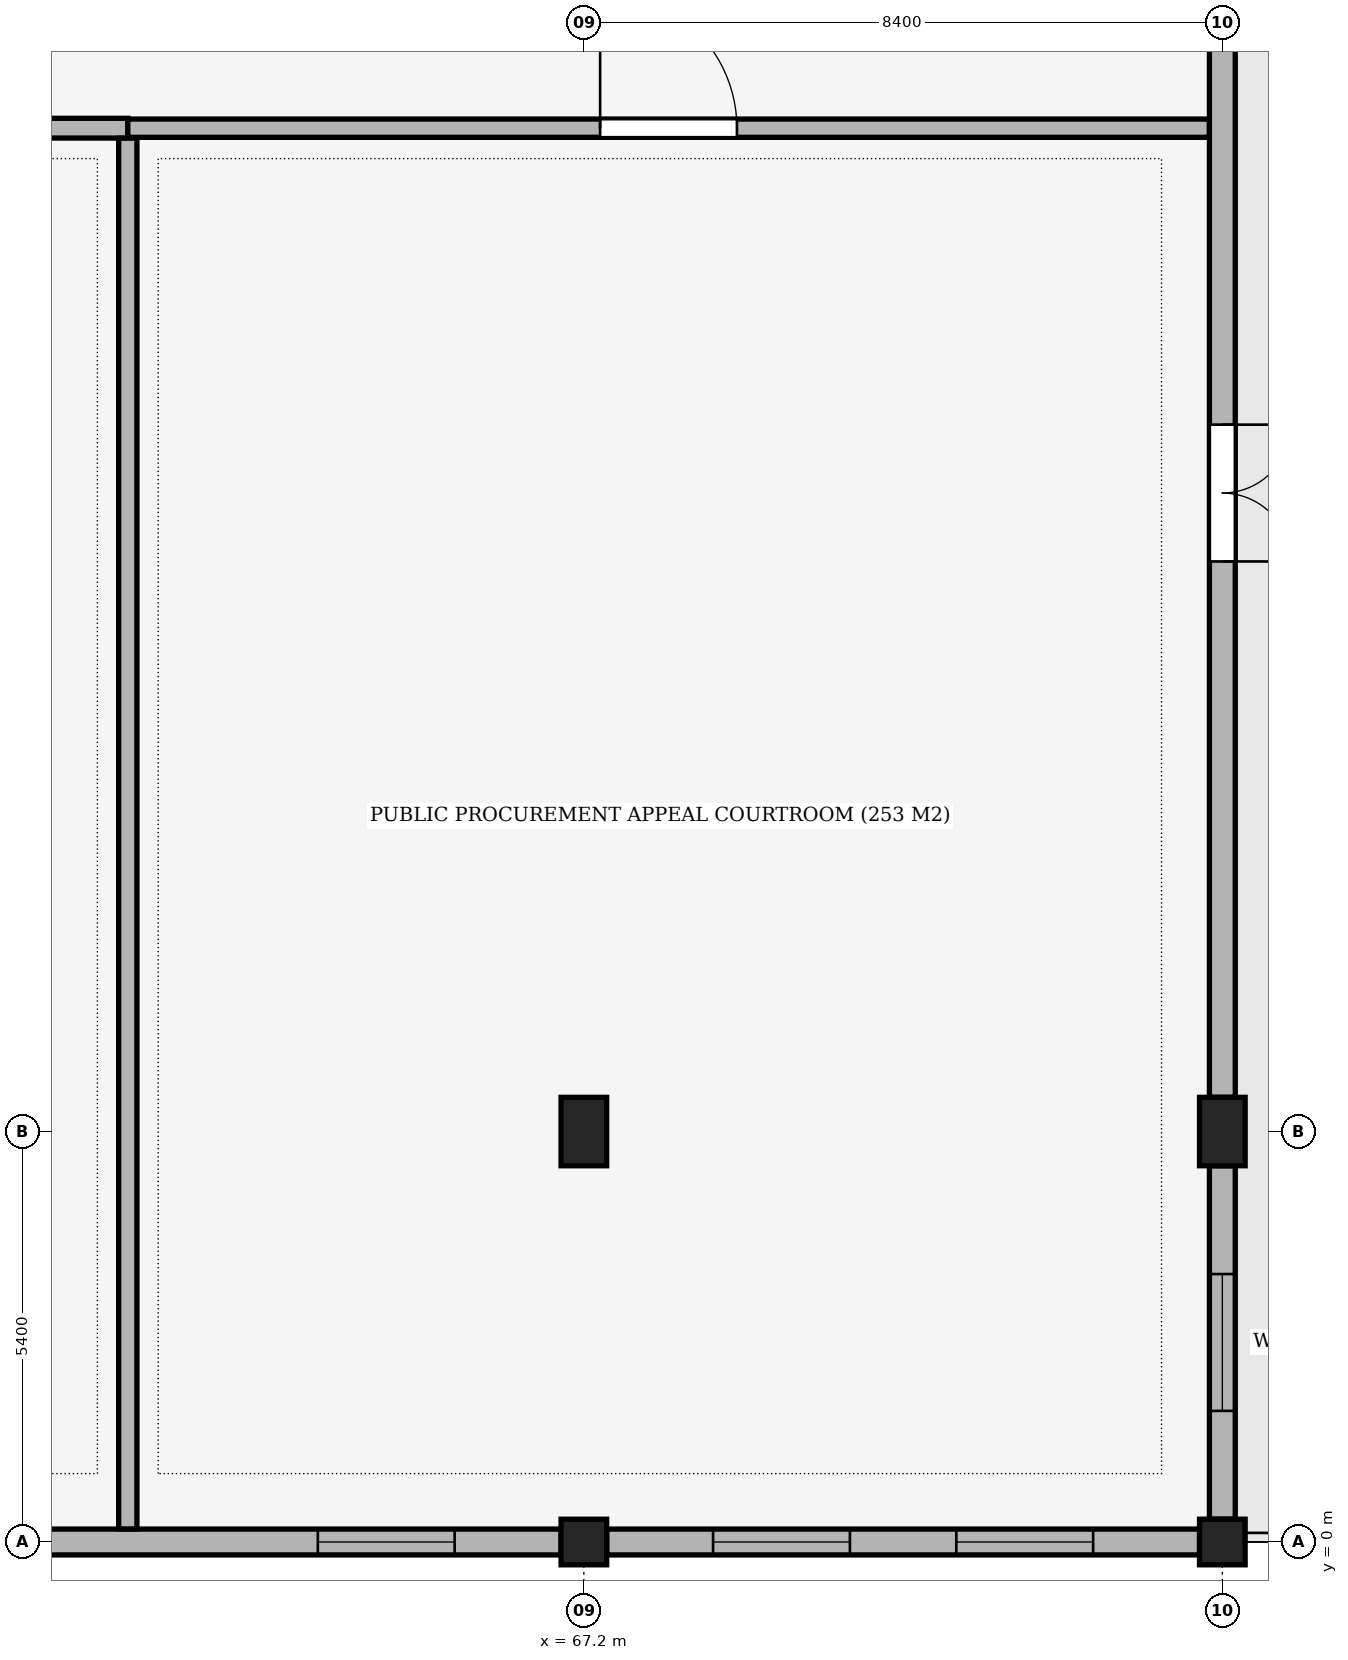
"""IFC4 building model, lengths in metres.
Left out: names, types, materials, properties, quantities, classifications, styles, units other than length and angle.
Written with IfcOpenShell. Run it as: python <this file> out.ifc"""

import sys

from ifc_helpers import new_model, si_unit, direction, frame, frame_2d, origin, origin_2d, place, context, subcontext, project, spatial, rectangle, extrude, element, fill, save


model = new_model("IFC4")
c1 = context("Model", 3, precision=1e-05, world=origin(), true_north=direction((0.0, 1.0)))
c2 = subcontext(c1, "Body", "Model", "MODEL_VIEW")
j1 = project(units=[si_unit("LENGTHUNIT", "METRE"), si_unit("PLANEANGLEUNIT", "RADIAN")], contexts=[c1])
p1 = place(None, origin())
s1 = spatial("IfcSite", under=j1, at=p1, CompositionType="ELEMENT")
p2 = place(p1, origin())
s2 = spatial("IfcBuilding", under=s1, at=p2, CompositionType="ELEMENT")
p3 = place(p2, frame((0.0, 0.0, 20.4)))
s3 = spatial("IfcBuildingStorey", under=s2, at=p3, CompositionType="ELEMENT", Elevation=20.4)
p4 = place(p3, frame((67.2, 0.0, 0.0), z_axis=(0.0, 0.0, 1.0), x_axis=(1.0, 0.0, 0.0)))
e1 = element("IfcColumn", 1, at=p4, inside=s3, PredefinedType="COLUMN", context=c2, shape_type="SweptSolid", body=[
    extrude(rectangle(XDim=0.6, YDim=0.6, at=origin_2d()), origin(), (0.0, 0.0, 1.0), 4.8),
])
p5 = place(p3, frame((67.2, 5.4, 0.0), z_axis=(0.0, 0.0, 1.0), x_axis=(1.0, 0.0, 0.0)))
e2 = element("IfcColumn", 2, at=p5, inside=s3, PredefinedType="COLUMN", context=c2, shape_type="SweptSolid", body=[
    extrude(rectangle(XDim=0.6, YDim=0.9, at=origin_2d()), origin(), (0.0, 0.0, 1.0), 4.8),
])
p6 = place(p3, frame((75.6, 0.0, 0.0), z_axis=(0.0, 0.0, 1.0), x_axis=(1.0, 0.0, 0.0)))
e3 = element("IfcColumn", 3, at=p6, inside=s3, PredefinedType="COLUMN", context=c2, shape_type="SweptSolid", body=[
    extrude(rectangle(XDim=0.6, YDim=0.6, at=origin_2d()), origin(), (0.0, 0.0, 1.0), 4.8),
])
p7 = place(p3, frame((75.6, 5.4, 0.0), z_axis=(0.0, 0.0, 1.0), x_axis=(1.0, 0.0, 0.0)))
e4 = element("IfcColumn", 4, at=p7, inside=s3, PredefinedType="COLUMN", context=c2, shape_type="SweptSolid", body=[
    extrude(rectangle(XDim=0.6, YDim=0.9, at=origin_2d()), origin(), (0.0, 0.0, 1.0), 4.8),
])
p8 = place(p3, frame((75.6, 21.75, 0.0), z_axis=(0.0, 0.0, 1.0), x_axis=(0.0, -1.0, 0.0)))
e5 = element("IfcWall", 5, at=p8, inside=s3, PredefinedType="SOLIDWALL", context=c2, shape_type="SweptSolid", body=[
    extrude(rectangle(XDim=15.9, YDim=0.34, at=frame_2d((7.95, 0.0))), origin(), (0.0, 0.0, 1.0), 3.5),
])
p9 = place(p8, frame((7.05, 0.0, 0.0)))
e6 = element("IfcOpeningElement", 6, at=p9, cuts=e5, PredefinedType="OPENING", context=c2, shape_type="SweptSolid", body=[
    extrude(rectangle(XDim=1.8, YDim=2.2, at=frame_2d((0.9, 1.1))), frame((0.0, 0.185, 0.0), z_axis=(0.0, -1.0, 0.0), x_axis=(1.0, 0.0, 0.0)), (0.0, 0.0, 1.0), 0.37),
])
p10 = place(p3, frame((75.6, 4.95, 0.0), z_axis=(0.0, 0.0, 1.0), x_axis=(0.0, -1.0, 0.0)))
e7 = element("IfcWall", 7, at=p10, inside=s3, PredefinedType="SOLIDWALL", context=c2, shape_type="SweptSolid", body=[
    extrude(rectangle(XDim=4.65, YDim=0.34, at=frame_2d((2.325, 0.0))), origin(), (0.0, 0.0, 1.0), 4.0),
])
p11 = place(p10, frame((1.425, 0.0, 0.85)))
e8 = element("IfcOpeningElement", 8, at=p11, cuts=e7, PredefinedType="OPENING", context=c2, shape_type="SweptSolid", body=[
    extrude(rectangle(XDim=1.8, YDim=2.4, at=frame_2d((0.9, 1.2))), frame((0.0, 0.185, 0.0), z_axis=(0.0, -1.0, 0.0), x_axis=(1.0, 0.0, 0.0)), (0.0, 0.0, 1.0), 0.37),
])
p12 = place(p3, frame((75.3, 0.0, 0.0), z_axis=(0.0, 0.0, 1.0), x_axis=(-1.0, 0.0, 0.0)))
e9 = element("IfcWall", 9, at=p12, inside=s3, PredefinedType="SOLIDWALL", context=c2, shape_type="SweptSolid", body=[
    extrude(rectangle(XDim=7.8, YDim=0.34, at=frame_2d((3.9, 0.0))), origin(), (0.0, 0.0, 1.0), 3.85),
])
p13 = place(p12, frame((1.4, 0.0, 0.85)))
e10 = element("IfcOpeningElement", 10, at=p13, cuts=e9, PredefinedType="OPENING", context=c2, shape_type="SweptSolid", body=[
    extrude(rectangle(XDim=1.8, YDim=2.4, at=frame_2d((0.9, 1.2))), frame((0.0, 0.185, 0.0), z_axis=(0.0, -1.0, 0.0), x_axis=(1.0, 0.0, 0.0)), (0.0, 0.0, 1.0), 0.37),
])
p14 = place(p12, frame((4.6, 0.0, 0.85)))
e11 = element("IfcOpeningElement", 11, at=p14, cuts=e9, PredefinedType="OPENING", context=c2, shape_type="SweptSolid", body=[
    extrude(rectangle(XDim=1.8, YDim=2.4, at=frame_2d((0.9, 1.2))), frame((0.0, 0.185, 0.0), z_axis=(0.0, -1.0, 0.0), x_axis=(1.0, 0.0, 0.0)), (0.0, 0.0, 1.0), 0.37),
])
p15 = place(p3, frame((66.9, 0.0, 0.0), z_axis=(0.0, 0.0, 1.0), x_axis=(-1.0, 0.0, 0.0)))
e12 = element("IfcWall", 12, at=p15, inside=s3, PredefinedType="SOLIDWALL", context=c2, shape_type="SweptSolid", body=[
    extrude(rectangle(XDim=7.8, YDim=0.34, at=frame_2d((3.9, 0.0))), origin(), (0.0, 0.0, 1.0), 3.85),
])
p16 = place(p15, frame((1.4, 0.0, 0.85)))
e13 = element("IfcOpeningElement", 13, at=p16, cuts=e12, PredefinedType="OPENING", context=c2, shape_type="SweptSolid", body=[
    extrude(rectangle(XDim=1.8, YDim=2.4, at=frame_2d((0.9, 1.2))), frame((0.0, 0.185, 0.0), z_axis=(0.0, -1.0, 0.0), x_axis=(1.0, 0.0, 0.0)), (0.0, 0.0, 1.0), 0.37),
])
p17 = place(p3, frame((47.6, 18.6, 0.0), z_axis=(0.0, 0.0, 1.0), x_axis=(1.0, 0.0, 0.0)))
e14 = element("IfcWall", 14, at=p17, inside=s3, PredefinedType="PARTITIONING", context=c2, shape_type="SweptSolid", body=[
    extrude(rectangle(XDim=13.6, YDim=0.26, at=frame_2d((6.8, 0.0))), origin(), (0.0, 0.0, 1.0), 3.5),
])
p18 = place(p17, frame((5.9, 0.0, 0.0)))
e15 = element("IfcOpeningElement", 15, at=p18, cuts=e14, PredefinedType="OPENING", context=c2, shape_type="SweptSolid", body=[
    extrude(rectangle(XDim=1.8, YDim=2.4, at=frame_2d((0.9, 1.2))), frame((0.0, 0.145, 0.0), z_axis=(0.0, -1.0, 0.0), x_axis=(1.0, 0.0, 0.0)), (0.0, 0.0, 1.0), 0.29),
])
p19 = place(p3, frame((61.2, 18.6, 0.0), z_axis=(0.0, 0.0, 1.0), x_axis=(1.0, 0.0, 0.0)))
e16 = element("IfcWall", 16, at=p19, inside=s3, PredefinedType="PARTITIONING", context=c2, shape_type="SweptSolid", body=[
    extrude(rectangle(XDim=14.228, YDim=0.24, at=frame_2d((7.114, 0.0))), origin(), (0.0, 0.0, 1.0), 3.5),
])
p20 = place(p19, frame((6.214, 0.0, 0.0)))
e17 = element("IfcOpeningElement", 17, at=p20, cuts=e16, PredefinedType="OPENING", context=c2, shape_type="SweptSolid", body=[
    extrude(rectangle(XDim=1.8, YDim=2.4, at=frame_2d((0.9, 1.2))), frame((0.0, 0.135, 0.0), z_axis=(0.0, -1.0, 0.0), x_axis=(1.0, 0.0, 0.0)), (0.0, 0.0, 1.0), 0.27),
])
p21 = place(p3, frame((61.2, 0.172, 0.0), z_axis=(0.0, 0.0, 1.0), x_axis=(0.0, 1.0, 0.0)))
e18 = element("IfcWall", 18, at=p21, inside=s3, PredefinedType="PARTITIONING", context=c2, shape_type="SweptSolid", body=[
    extrude(rectangle(XDim=18.296, YDim=0.24, at=frame_2d((9.148, 0.0))), origin(), (0.0, 0.0, 1.0), 3.85),
])
p22 = place(p9, origin())
e19 = element("IfcDoor", 19, at=p22, inside=s3, OperationType="DOUBLE_DOOR_SINGLE_SWING", PredefinedType="DOOR", context=c2, shape_type="SweptSolid", body=[
    extrude(rectangle(XDim=1.8, YDim=2.2, at=frame_2d((0.9, 1.1))), frame((0.0, 0.025, 0.0), z_axis=(0.0, -1.0, 0.0), x_axis=(1.0, 0.0, 0.0)), (0.0, 0.0, 1.0), 0.05),
])
fill(e6, e19)
p23 = place(p11, origin())
e20 = element("IfcWindow", 20, at=p23, inside=s3, PartitioningType="SINGLE_PANEL", PredefinedType="WINDOW", context=c2, shape_type="SweptSolid", body=[
    extrude(rectangle(XDim=1.8, YDim=2.4, at=frame_2d((0.9, 1.2))), frame((0.0, 0.03, 0.0), z_axis=(0.0, -1.0, 0.0), x_axis=(1.0, 0.0, 0.0)), (0.0, 0.0, 1.0), 0.06),
])
fill(e8, e20)
p24 = place(p13, origin())
e21 = element("IfcWindow", 21, at=p24, inside=s3, PartitioningType="SINGLE_PANEL", PredefinedType="WINDOW", context=c2, shape_type="SweptSolid", body=[
    extrude(rectangle(XDim=1.8, YDim=2.4, at=frame_2d((0.9, 1.2))), frame((0.0, 0.03, 0.0), z_axis=(0.0, -1.0, 0.0), x_axis=(1.0, 0.0, 0.0)), (0.0, 0.0, 1.0), 0.06),
])
fill(e10, e21)
p25 = place(p14, origin())
e22 = element("IfcWindow", 22, at=p25, inside=s3, PartitioningType="SINGLE_PANEL", PredefinedType="WINDOW", context=c2, shape_type="SweptSolid", body=[
    extrude(rectangle(XDim=1.8, YDim=2.4, at=frame_2d((0.9, 1.2))), frame((0.0, 0.03, 0.0), z_axis=(0.0, -1.0, 0.0), x_axis=(1.0, 0.0, 0.0)), (0.0, 0.0, 1.0), 0.06),
])
fill(e11, e22)
p26 = place(p16, origin())
e23 = element("IfcWindow", 23, at=p26, inside=s3, PartitioningType="SINGLE_PANEL", PredefinedType="WINDOW", context=c2, shape_type="SweptSolid", body=[
    extrude(rectangle(XDim=1.8, YDim=2.4, at=frame_2d((0.9, 1.2))), frame((0.0, 0.03, 0.0), z_axis=(0.0, -1.0, 0.0), x_axis=(1.0, 0.0, 0.0)), (0.0, 0.0, 1.0), 0.06),
])
fill(e13, e23)
p27 = place(p20, origin())
e24 = element("IfcDoor", 24, at=p27, inside=s3, OperationType="SINGLE_SWING_LEFT", PredefinedType="DOOR", context=c2, shape_type="SweptSolid", body=[
    extrude(rectangle(XDim=1.8, YDim=2.4, at=frame_2d((0.9, 1.2))), frame((0.0, 0.025, 0.0), z_axis=(0.0, -1.0, 0.0), x_axis=(1.0, 0.0, 0.0)), (0.0, 0.0, 1.0), 0.05),
])
fill(e17, e24)
save(model, sys.argv[1])
